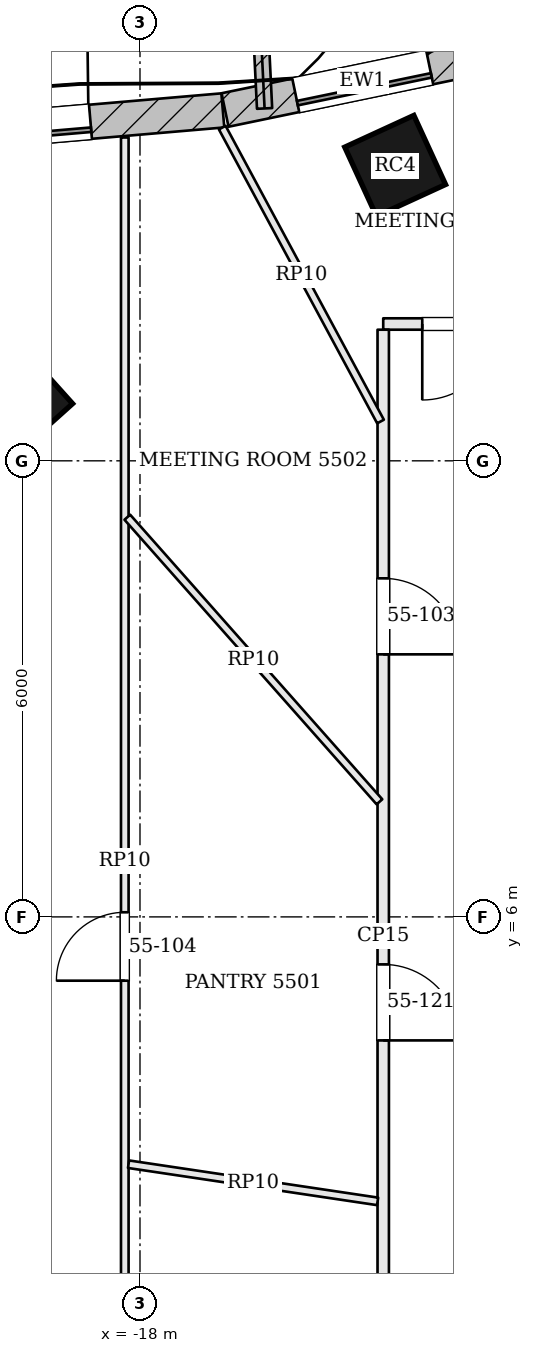
"""IFC4 building model, lengths in metres.
Left out: names, types, materials, properties, quantities, classifications, styles, units other than length and angle.
Written with IfcOpenShell. Run it as: python <this file> out.ifc"""

import sys

from ifc_helpers import new_model, si_unit, direction, frame, frame_2d, origin, origin_2d, place, context, subcontext, project, spatial, rectangle, extrude, element, fill, save


model = new_model("IFC4")
c1 = context("Model", 3, precision=1e-05, world=origin(), true_north=direction((0.0, 1.0)))
c2 = subcontext(c1, "Body", "Model", "MODEL_VIEW")
j1 = project(units=[si_unit("LENGTHUNIT", "METRE"), si_unit("PLANEANGLEUNIT", "RADIAN")], contexts=[c1])
p1 = place(None, origin())
s1 = spatial("IfcSite", under=j1, at=p1, CompositionType="ELEMENT")
p2 = place(p1, origin())
s2 = spatial("IfcBuilding", under=s1, at=p2, CompositionType="ELEMENT")
p3 = place(p2, frame((0.0, 0.0, 225.3)))
s3 = spatial("IfcBuildingStorey", under=s2, at=p3, CompositionType="ELEMENT", Elevation=225.3)
for number, where, z_axis, x_axis in (
    (1, (-14.643, 15.881, 0.0), (0.0, 0.0, 1.0), (-0.909, -0.417, 0.0)),
    (2, (-19.593, 12.79, 0.0), (0.0, 0.0, 1.0), (-0.744, -0.668, 0.0)),
):
    element("IfcColumn", number, at=place(p3, frame(where, z_axis=z_axis, x_axis=x_axis)), inside=s3, PredefinedType="COLUMN", context=c2, shape_type="SweptSolid", body=[
        extrude(rectangle(XDim=1.0, YDim=1.0, at=origin_2d()), origin(), (0.0, 0.0, 1.0), 3.9),
    ])
p4 = place(p3, frame((-13.258, 17.367, 0.0), z_axis=(0.0, 0.0, 1.0), x_axis=(-0.97914968674, -0.203140077183, 0.0)))
e3 = element("IfcWall", 3, at=p4, inside=s3, PredefinedType="SOLIDWALL", context=c2, shape_type="SweptSolid", body=[
    extrude(rectangle(XDim=3.7, YDim=0.45, at=frame_2d((1.85, 0.0))), origin(), (0.0, 0.0, 1.0), 3.7),
])
p5 = place(p4, frame((0.95, 0.0, 0.9)))
e4 = element("IfcOpeningElement", 4, at=p5, cuts=e3, PredefinedType="OPENING", context=c2, shape_type="SweptSolid", body=[
    extrude(rectangle(XDim=1.8, YDim=2.3, at=frame_2d((0.9, 1.15))), frame((0.0, 0.235, 0.0), z_axis=(0.0, -1.0, 0.0), x_axis=(1.0, 0.0, 0.0)), (0.0, 0.0, 1.0), 0.47),
])
p6 = place(p3, frame((-16.91, 16.61, 0.0), z_axis=(0.0, 0.0, 1.0), x_axis=(-0.996333165816, -0.085558299972, 0.0)))
e5 = element("IfcWall", 5, at=p6, inside=s3, PredefinedType="SOLIDWALL", context=c2, shape_type="SweptSolid", body=[
    extrude(rectangle(XDim=5.596, YDim=0.45, at=frame_2d((2.798, 0.0))), origin(), (0.0, 0.0, 1.0), 3.7),
])
p7 = place(p6, frame((1.748, 0.0, 0.9)))
e6 = element("IfcOpeningElement", 6, at=p7, cuts=e5, PredefinedType="OPENING", context=c2, shape_type="SweptSolid", body=[
    extrude(rectangle(XDim=2.1, YDim=2.3, at=frame_2d((1.05, 1.15))), frame((0.0, 0.235, 0.0), z_axis=(0.0, -1.0, 0.0), x_axis=(1.0, 0.0, 0.0)), (0.0, 0.0, 1.0), 0.47),
])
p8 = place(p3, frame((-16.361, 16.636, 0.0), z_axis=(0.0, 0.0, 1.0), x_axis=(-0.048552811097, 0.998820616795, 0.0)))
e7 = element("IfcWall", 7, at=p8, inside=s3, PredefinedType="SOLIDWALL", context=c2, shape_type="SweptSolid", body=[
    extrude(rectangle(XDim=1.75, YDim=0.2, at=frame_2d((0.875, 0.0))), origin(), (0.0, 0.0, 1.0), 3.7),
])
p9 = place(p3, frame((-6.048, 13.8, 0.0), z_axis=(0.0, 0.0, 1.0), x_axis=(-1.0, 0.0, 0.0)))
e8 = element("IfcWall", 8, at=p9, inside=s3, PredefinedType="PARTITIONING", context=c2, shape_type="SweptSolid", body=[
    extrude(rectangle(XDim=8.752, YDim=0.15, at=frame_2d((4.376, 0.0))), origin(), (0.0, 0.0, 1.0), 3.084),
])
p10 = place(p9, frame((1.788, 0.0, 0.0)))
e9 = element("IfcOpeningElement", 9, at=p10, cuts=e8, PredefinedType="OPENING", context=c2, shape_type="SweptSolid", body=[
    extrude(rectangle(XDim=1.8, YDim=2.1, at=frame_2d((0.9, 1.05))), frame((0.0, 0.085, 0.0), z_axis=(0.0, -1.0, 0.0), x_axis=(1.0, 0.0, 0.0)), (0.0, 0.0, 1.0), 0.17),
])
p11 = place(p9, frame((7.239, 0.0, 0.0)))
e10 = element("IfcOpeningElement", 10, at=p11, cuts=e8, PredefinedType="OPENING", context=c2, shape_type="SweptSolid", body=[
    extrude(rectangle(XDim=1.0, YDim=2.4, at=frame_2d((0.5, 1.2))), frame((0.0, 0.085, 0.0), z_axis=(0.0, -1.0, 0.0), x_axis=(1.0, 0.0, 0.0)), (0.0, 0.0, 1.0), 0.17),
])
p12 = place(p3, frame((-14.8, 13.725, 0.0), z_axis=(0.0, 0.0, 1.0), x_axis=(0.0, -1.0, 0.0)))
e11 = element("IfcWall", 11, at=p12, inside=s3, PredefinedType="PARTITIONING", context=c2, shape_type="SweptSolid", body=[
    extrude(rectangle(XDim=15.965, YDim=0.15, at=frame_2d((7.982, 0.0))), origin(), (0.0, 0.0, 1.0), 3.084),
])
p13 = place(p12, frame((3.271, 0.0, 0.0)))
e12 = element("IfcOpeningElement", 12, at=p13, cuts=e11, PredefinedType="OPENING", context=c2, shape_type="SweptSolid", body=[
    extrude(rectangle(XDim=1.0, YDim=2.4, at=frame_2d((0.5, 1.2))), frame((0.0, 0.085, 0.0), z_axis=(0.0, -1.0, 0.0), x_axis=(1.0, 0.0, 0.0)), (0.0, 0.0, 1.0), 0.17),
])
p14 = place(p12, frame((8.35, 0.0, 0.0)))
e13 = element("IfcOpeningElement", 13, at=p14, cuts=e11, PredefinedType="OPENING", context=c2, shape_type="SweptSolid", body=[
    extrude(rectangle(XDim=1.0, YDim=2.1, at=frame_2d((0.5, 1.05))), frame((0.0, 0.085, 0.0), z_axis=(0.0, -1.0, 0.0), x_axis=(1.0, 0.0, 0.0)), (0.0, 0.0, 1.0), 0.17),
])
p15 = place(p12, frame((13.15, 0.0, 0.0)))
e14 = element("IfcOpeningElement", 14, at=p15, cuts=e11, PredefinedType="OPENING", context=c2, shape_type="SweptSolid", body=[
    extrude(rectangle(XDim=1.0, YDim=2.1, at=frame_2d((0.5, 1.05))), frame((0.0, 0.085, 0.0), z_axis=(0.0, -1.0, 0.0), x_axis=(1.0, 0.0, 0.0)), (0.0, 0.0, 1.0), 0.17),
])
p16 = place(p3, frame((-18.2, -2.79, 0.0), z_axis=(0.0, 0.0, 1.0), x_axis=(0.0, 1.0, 0.0)))
e15 = element("IfcWall", 15, at=p16, inside=s3, PredefinedType="PARTITIONING", context=c2, shape_type="SweptSolid", body=[
    extrude(rectangle(XDim=19.044, YDim=0.1, at=frame_2d((9.522, 0.0))), origin(), (0.0, 0.0, 1.0), 3.084),
])
p17 = place(p16, frame((7.951, 0.0, 0.0)))
e16 = element("IfcOpeningElement", 16, at=p17, cuts=e15, PredefinedType="OPENING", context=c2, shape_type="SweptSolid", body=[
    extrude(rectangle(XDim=0.9, YDim=2.1, at=frame_2d((0.45, 1.05))), frame((0.0, 0.06, 0.0), z_axis=(0.0, -1.0, 0.0), x_axis=(1.0, 0.0, 0.0)), (0.0, 0.0, 1.0), 0.12),
])
p18 = place(p16, frame((2.116, 0.0, 0.0)))
e17 = element("IfcOpeningElement", 17, at=p18, cuts=e15, PredefinedType="OPENING", context=c2, shape_type="SweptSolid", body=[
    extrude(rectangle(XDim=0.9, YDim=2.1, at=frame_2d((0.45, 1.05))), frame((0.0, 0.06, 0.0), z_axis=(0.0, -1.0, 0.0), x_axis=(1.0, 0.0, 0.0)), (0.0, 0.0, 1.0), 0.12),
])
p19 = place(p3, frame((-14.836, 12.517, 0.0), z_axis=(0.0, 0.0, 1.0), x_axis=(-0.474069987859, 0.880487164365, 0.0)))
e18 = element("IfcWall", 18, at=p19, inside=s3, PredefinedType="PARTITIONING", context=c2, shape_type="SweptSolid", body=[
    extrude(rectangle(XDim=4.392, YDim=0.1, at=frame_2d((2.196, 0.0))), origin(), (0.0, 0.0, 1.0), 3.084),
])
p20 = place(p3, frame((-14.85, 7.514, 0.0), z_axis=(0.0, 0.0, 1.0), x_axis=(-0.663136045348, 0.748498888015, 0.0)))
e19 = element("IfcWall", 19, at=p20, inside=s3, PredefinedType="PARTITIONING", context=c2, shape_type="SweptSolid", body=[
    extrude(rectangle(XDim=5.002, YDim=0.1, at=frame_2d((2.501, 0.0))), origin(), (0.0, 0.0, 1.0), 3.084),
])
p21 = place(p3, frame((-14.874, 2.257, 0.0), z_axis=(0.0, 0.0, 1.0), x_axis=(-0.989042600295, 0.147630399314, 0.0)))
e20 = element("IfcWall", 20, at=p21, inside=s3, PredefinedType="PARTITIONING", context=c2, shape_type="SweptSolid", body=[
    extrude(rectangle(XDim=3.312, YDim=0.1, at=frame_2d((1.656, 0.0))), origin(), (0.0, 0.0, 1.0), 3.084),
])
p22 = place(p5, origin())
e21 = element("IfcWindow", 21, at=p22, inside=s3, PartitioningType="SINGLE_PANEL", PredefinedType="WINDOW", context=c2, shape_type="SweptSolid", body=[
    extrude(rectangle(XDim=1.8, YDim=2.3, at=frame_2d((0.9, 1.15))), frame((0.0, 0.135, 0.0), z_axis=(0.0, -1.0, 0.0), x_axis=(1.0, 0.0, 0.0)), (0.0, 0.0, 1.0), 0.06),
])
fill(e4, e21)
p23 = place(p7, origin())
e22 = element("IfcWindow", 22, at=p23, inside=s3, PartitioningType="SINGLE_PANEL", PredefinedType="WINDOW", context=c2, shape_type="SweptSolid", body=[
    extrude(rectangle(XDim=2.1, YDim=2.3, at=frame_2d((1.05, 1.15))), frame((0.0, 0.135, 0.0), z_axis=(0.0, -1.0, 0.0), x_axis=(1.0, 0.0, 0.0)), (0.0, 0.0, 1.0), 0.06),
])
fill(e6, e22)
p24 = place(p11, origin())
e23 = element("IfcDoor", 23, at=p24, inside=s3, OperationType="SINGLE_SWING_RIGHT", PredefinedType="DOOR", context=c2, shape_type="SweptSolid", body=[
    extrude(rectangle(XDim=1.0, YDim=2.4, at=frame_2d((0.5, 1.2))), frame((0.0, 0.025, 0.0), z_axis=(0.0, -1.0, 0.0), x_axis=(1.0, 0.0, 0.0)), (0.0, 0.0, 1.0), 0.05),
])
fill(e10, e23)
p25 = place(p13, origin())
e24 = element("IfcDoor", 24, at=p25, inside=s3, OperationType="SINGLE_SWING_RIGHT", PredefinedType="DOOR", context=c2, shape_type="SweptSolid", body=[
    extrude(rectangle(XDim=1.0, YDim=2.4, at=frame_2d((0.5, 1.2))), frame((0.0, 0.025, 0.0), z_axis=(0.0, -1.0, 0.0), x_axis=(1.0, 0.0, 0.0)), (0.0, 0.0, 1.0), 0.05),
])
fill(e12, e24)
p26 = place(p17, origin())
e25 = element("IfcDoor", 25, at=p26, inside=s3, OperationType="SINGLE_SWING_LEFT", PredefinedType="DOOR", context=c2, shape_type="SweptSolid", body=[
    extrude(rectangle(XDim=0.9, YDim=2.1, at=frame_2d((0.45, 1.05))), frame((0.0, 0.025, 0.0), z_axis=(0.0, -1.0, 0.0), x_axis=(1.0, 0.0, 0.0)), (0.0, 0.0, 1.0), 0.05),
])
fill(e16, e25)
p27 = place(p14, origin())
e26 = element("IfcDoor", 26, at=p27, inside=s3, OperationType="SINGLE_SWING_RIGHT", PredefinedType="DOOR", context=c2, shape_type="SweptSolid", body=[
    extrude(rectangle(XDim=1.0, YDim=2.1, at=frame_2d((0.5, 1.05))), frame((0.0, 0.025, 0.0), z_axis=(0.0, -1.0, 0.0), x_axis=(1.0, 0.0, 0.0)), (0.0, 0.0, 1.0), 0.05),
])
fill(e13, e26)
save(model, sys.argv[1])
